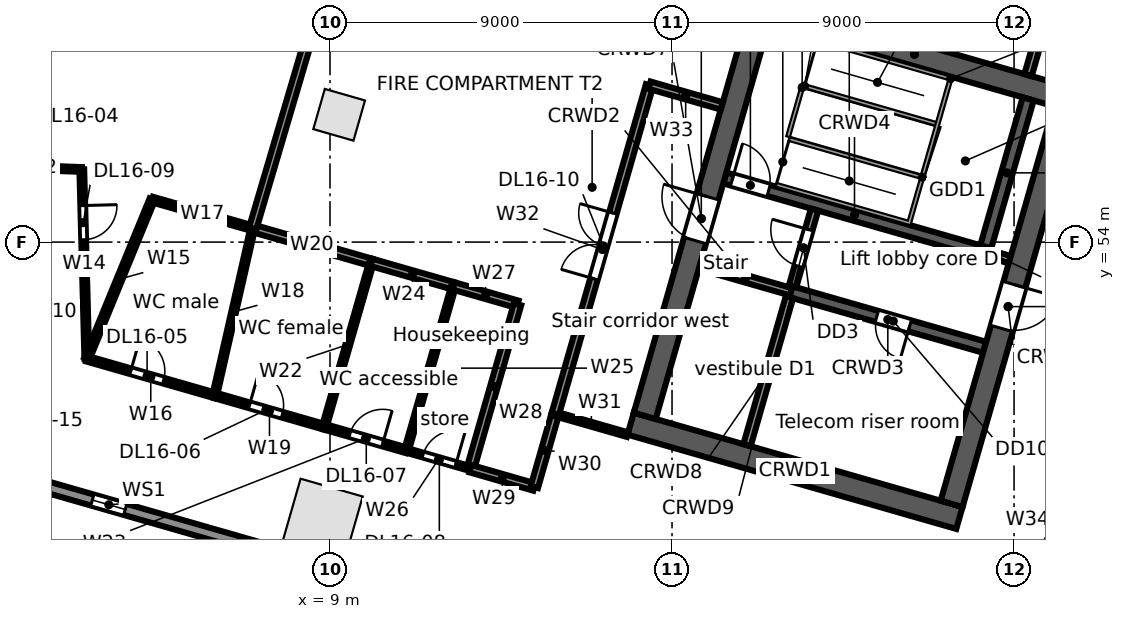
"""IFC4 building model, lengths in metres.
Left out: names, types, materials, properties, quantities, classifications, styles, units other than length and angle.
Written with IfcOpenShell. Run it as: python <this file> out.ifc"""

import sys

from ifc_helpers import new_model, si_unit, direction, frame, frame_2d, origin, origin_2d, place, context, subcontext, project, spatial, rectangle, extrude, element, fill, save


model = new_model("IFC4")
c1 = context("Model", 3, precision=1e-05, world=origin(), true_north=direction((0.0, 1.0)))
c2 = subcontext(c1, "Body", "Model", "MODEL_VIEW")
j1 = project(units=[si_unit("LENGTHUNIT", "METRE"), si_unit("PLANEANGLEUNIT", "RADIAN")], contexts=[c1])
p1 = place(None, origin())
s1 = spatial("IfcSite", under=j1, at=p1, CompositionType="ELEMENT")
p2 = place(p1, origin())
s2 = spatial("IfcBuilding", under=s1, at=p2, CompositionType="ELEMENT")
p3 = place(p2, frame((0.0, 0.0, 86.5)))
s3 = spatial("IfcBuildingStorey", under=s2, at=p3, CompositionType="ELEMENT", Elevation=86.5)
p4 = place(p3, frame((8.81, 46.722, 0.0), z_axis=(0.0, 0.0, 1.0), x_axis=(0.961261695938, -0.275637355817, 0.0)))
e1 = element("IfcColumn", 1, at=p4, inside=s3, PredefinedType="COLUMN", context=c2, shape_type="SweptSolid", body=[
    extrude(rectangle(XDim=1.7, YDim=1.7, at=origin_2d()), origin(), (0.0, 0.0, 1.0), 5.0),
])
p5 = place(p3, frame((9.241, 57.35, 0.0), z_axis=(0.0, 0.0, 1.0), x_axis=(0.961261695938, -0.275637355817, 0.0)))
e2 = element("IfcColumn", 2, at=p5, inside=s3, PredefinedType="COLUMN", context=c2, shape_type="SweptSolid", body=[
    extrude(rectangle(XDim=1.1, YDim=1.1, at=origin_2d()), origin(), (0.0, 0.0, 1.0), 5.0),
])
p6 = place(p3, frame((25.398, 40.717, 0.0), z_axis=(0.0, 0.0, 1.0), x_axis=(-0.961262423262, 0.275634819324, 0.0)))
e3 = element("IfcWall", 3, at=p6, inside=s3, PredefinedType="STANDARD", context=c2, shape_type="SweptSolid", body=[
    extrude(rectangle(XDim=26.359, YDim=0.3, at=frame_2d((13.179, 0.0))), origin(), (0.0, 0.0, 1.0), 4.65),
])
p7 = place(p6, frame((22.664, 0.0, 0.6)))
e4 = element("IfcOpeningElement", 4, at=p7, cuts=e3, PredefinedType="OPENING", context=c2, shape_type="SweptSolid", body=[
    extrude(rectangle(XDim=0.9, YDim=3.2, at=frame_2d((0.45, 1.6))), frame((0.0, 0.16, 0.0), z_axis=(0.0, -1.0, 0.0), x_axis=(1.0, 0.0, 0.0)), (0.0, 0.0, 1.0), 0.32),
])
p8 = place(p6, frame((13.844, 0.0, 0.6)))
e5 = element("IfcOpeningElement", 5, at=p8, cuts=e3, PredefinedType="OPENING", context=c2, shape_type="SweptSolid", body=[
    extrude(rectangle(XDim=0.9, YDim=3.2, at=frame_2d((0.45, 1.6))), frame((0.0, 0.16, 0.0), z_axis=(0.0, -1.0, 0.0), x_axis=(1.0, 0.0, 0.0)), (0.0, 0.0, 1.0), 0.32),
])
p9 = place(p6, frame((5.023, 0.0, 0.6)))
e6 = element("IfcOpeningElement", 6, at=p9, cuts=e3, PredefinedType="OPENING", context=c2, shape_type="SweptSolid", body=[
    extrude(rectangle(XDim=0.9, YDim=3.2, at=frame_2d((0.45, 1.6))), frame((0.0, 0.16, 0.0), z_axis=(0.0, -1.0, 0.0), x_axis=(1.0, 0.0, 0.0)), (0.0, 0.0, 1.0), 0.32),
])
p10 = place(p3, frame((16.911, 49.221, 0.0), z_axis=(0.0, 0.0, 1.0), x_axis=(0.96126248289, -0.275634611374, 0.0)))
e7 = element("IfcWall", 7, at=p10, inside=s3, PredefinedType="SOLIDWALL", context=c2, shape_type="SweptSolid", body=[
    extrude(rectangle(XDim=9.0, YDim=0.6, at=frame_2d((4.5, 0.0))), origin(), (0.0, 0.0, 1.0), 4.65),
])
p11 = place(p3, frame((18.728, 53.382, 0.0), z_axis=(0.0, 0.0, 1.0), x_axis=(0.961247070632, -0.275688355216, 0.0)))
e8 = element("IfcWall", 8, at=p11, inside=s3, PredefinedType="SOLIDWALL", context=c2, shape_type="SweptSolid", body=[
    extrude(rectangle(XDim=2.5, YDim=0.2, at=frame_2d((1.25, 0.0))), origin(), (0.0, 0.0, 1.0), 4.65),
])
p12 = place(p3, frame((21.131, 52.692, 0.0), z_axis=(0.0, 0.0, 1.0), x_axis=(0.961271492568, -0.275603188616, 0.0)))
e9 = element("IfcWall", 9, at=p12, inside=s3, PredefinedType="SOLIDWALL", context=c2, shape_type="SweptSolid", body=[
    extrude(rectangle(XDim=5.3, YDim=0.3, at=frame_2d((2.65, 0.0))), origin(), (0.0, 0.0, 1.0), 4.65),
])
p13 = place(p12, frame((2.35, 0.0, 0.0)))
e10 = element("IfcOpeningElement", 10, at=p13, cuts=e9, PredefinedType="OPENING", context=c2, shape_type="SweptSolid", body=[
    extrude(rectangle(XDim=0.9, YDim=2.1, at=frame_2d((0.45, 1.05))), frame((0.0, 0.16, 0.0), z_axis=(0.0, -1.0, 0.0), x_axis=(1.0, 0.0, 0.0)), (0.0, 0.0, 1.0), 0.32),
])
p14 = place(p3, frame((19.389, 55.689, 0.0), z_axis=(0.0, 0.0, 1.0), x_axis=(0.961261397636, -0.275638396117, 0.0)))
e11 = element("IfcWall", 11, at=p14, inside=s3, PredefinedType="SOLIDWALL", context=c2, shape_type="SweptSolid", body=[
    extrude(rectangle(XDim=7.1, YDim=0.3, at=frame_2d((3.55, 0.0))), origin(), (0.0, 0.0, 1.0), 4.65),
])
p15 = place(p14, frame((0.2, 0.0, 0.0)))
e12 = element("IfcOpeningElement", 12, at=p15, cuts=e11, PredefinedType="OPENING", context=c2, shape_type="SweptSolid", body=[
    extrude(rectangle(XDim=1.0, YDim=2.1, at=frame_2d((0.5, 1.05))), frame((0.0, 0.16, 0.0), z_axis=(0.0, -1.0, 0.0), x_axis=(1.0, 0.0, 0.0)), (0.0, 0.0, 1.0), 0.32),
])
p16 = place(p3, frame((26.214, 53.732, 0.0), z_axis=(0.0, 0.0, 1.0), x_axis=(0.96122076476, -0.27578005982, 0.0)))
e13 = element("IfcWall", 13, at=p16, inside=s3, PredefinedType="SOLIDWALL", context=c2, shape_type="SweptSolid", body=[
    extrude(rectangle(XDim=0.7, YDim=0.2, at=frame_2d((0.35, 0.0))), origin(), (0.0, 0.0, 1.0), 4.65),
])
p17 = place(p3, frame((20.053, 60.18, 0.0), z_axis=(0.0, 0.0, 1.0), x_axis=(0.96126248289, -0.275634611374, 0.0)))
e14 = element("IfcWall", 14, at=p17, inside=s3, PredefinedType="SOLIDWALL", context=c2, shape_type="SweptSolid", body=[
    extrude(rectangle(XDim=9.0, YDim=0.6, at=frame_2d((4.5, 0.0))), origin(), (0.0, 0.0, 1.0), 4.65),
])
p18 = place(p3, frame((17.282, 49.427, 0.0), z_axis=(0.0, 0.0, 1.0), x_axis=(0.275631631629, 0.961263337304, 0.0)))
e15 = element("IfcWall", 15, at=p18, inside=s3, PredefinedType="SOLIDWALL", context=c2, shape_type="SweptSolid", body=[
    extrude(rectangle(XDim=10.8, YDim=0.6, at=frame_2d((5.4, 0.0))), origin(), (0.0, 0.0, 1.0), 4.65),
])
p19 = place(p18, frame((4.8, 0.0, 0.0)))
e16 = element("IfcOpeningElement", 16, at=p19, cuts=e15, PredefinedType="OPENING", context=c2, shape_type="SweptSolid", body=[
    extrude(rectangle(XDim=1.2, YDim=2.1, at=frame_2d((0.6, 1.05))), frame((0.0, 0.31, 0.0), z_axis=(0.0, -1.0, 0.0), x_axis=(1.0, 0.0, 0.0)), (0.0, 0.0, 1.0), 0.62),
])
p20 = place(p3, frame((19.973, 48.655, 0.0), z_axis=(0.0, 0.0, 1.0), x_axis=(0.275668441653, 0.961252781674, 0.0)))
e17 = element("IfcWall", 17, at=p20, inside=s3, PredefinedType="SOLIDWALL", context=c2, shape_type="SweptSolid", body=[
    extrude(rectangle(XDim=4.05, YDim=0.2, at=frame_2d((2.025, 0.0))), origin(), (0.0, 0.0, 1.0), 4.65),
])
p21 = place(p3, frame((21.172, 52.837, 0.0), z_axis=(0.0, 0.0, 1.0), x_axis=(0.275657676022, 0.961255868981, 0.0)))
e18 = element("IfcWall", 18, at=p21, inside=s3, PredefinedType="PARTITIONING", context=c2, shape_type="SweptSolid", body=[
    extrude(rectangle(XDim=2.1, YDim=0.2, at=frame_2d((1.05, 0.0))), origin(), (0.0, 0.0, 1.0), 4.65),
])
p22 = place(p21, frame((0.55, 0.0, 0.0)))
e19 = element("IfcOpeningElement", 19, at=p22, cuts=e18, PredefinedType="OPENING", context=c2, shape_type="SweptSolid", body=[
    extrude(rectangle(XDim=1.0, YDim=2.1, at=frame_2d((0.5, 1.05))), frame((0.0, 0.11, 0.0), z_axis=(0.0, -1.0, 0.0), x_axis=(1.0, 0.0, 0.0)), (0.0, 0.0, 1.0), 0.22),
])
p23 = place(p3, frame((26.256, 53.876, 0.0), z_axis=(0.0, 0.0, 1.0), x_axis=(0.275612739511, 0.961268754209, 0.0)))
e20 = element("IfcWall", 20, at=p23, inside=s3, PredefinedType="SOLIDWALL", context=c2, shape_type="SweptSolid", body=[
    extrude(rectangle(XDim=4.05, YDim=0.3, at=frame_2d((2.025, 0.0))), origin(), (0.0, 0.0, 1.0), 4.65),
])
p24 = place(p3, frame((25.356, 47.112, 0.0), z_axis=(0.0, 0.0, 1.0), x_axis=(0.275631631629, 0.961263337304, 0.0)))
e21 = element("IfcWall", 21, at=p24, inside=s3, PredefinedType="SOLIDWALL", context=c2, shape_type="SweptSolid", body=[
    extrude(rectangle(XDim=10.8, YDim=0.6, at=frame_2d((5.4, 0.0))), origin(), (0.0, 0.0, 1.0), 4.65),
])
p25 = place(p24, frame((4.8, 0.0, 0.0)))
e22 = element("IfcOpeningElement", 22, at=p25, cuts=e21, PredefinedType="OPENING", context=c2, shape_type="SweptSolid", body=[
    extrude(rectangle(XDim=1.2, YDim=2.1, at=frame_2d((0.6, 1.05))), frame((0.0, 0.31, 0.0), z_axis=(0.0, -1.0, 0.0), x_axis=(1.0, 0.0, 0.0)), (0.0, 0.0, 1.0), 0.62),
])
p26 = place(p3, frame((0.0, 56.0, 0.0), z_axis=(0.0, 0.0, 1.0), x_axis=(0.999349313684, -0.036068673934, 0.0)))
e23 = element("IfcWall", 23, at=p26, inside=s3, PredefinedType="PARTITIONING", context=c2, shape_type="SweptSolid", body=[
    extrude(rectangle(XDim=2.471, YDim=0.125, at=frame_2d((1.235, 0.0))), origin(), (0.0, 0.0, 1.0), 4.65),
])
p27 = place(p3, frame((2.469, 55.911, 0.0), z_axis=(0.0, 0.0, 1.0), x_axis=(0.02651808123, -0.999648333849, 0.0)))
e24 = element("IfcWall", 24, at=p27, inside=s3, PredefinedType="PARTITIONING", context=c2, shape_type="SweptSolid", body=[
    extrude(rectangle(XDim=4.981, YDim=0.125, at=frame_2d((2.49, 0.0))), origin(), (0.0, 0.0, 1.0), 4.65),
])
p28 = place(p27, frame((0.95, 0.0, 0.0)))
e25 = element("IfcOpeningElement", 25, at=p28, cuts=e24, PredefinedType="OPENING", context=c2, shape_type="SweptSolid", body=[
    extrude(rectangle(XDim=0.9, YDim=2.1, at=frame_2d((0.45, 1.05))), frame((0.0, 0.073, 0.0), z_axis=(0.0, -1.0, 0.0), x_axis=(1.0, 0.0, 0.0)), (0.0, 0.0, 1.0), 0.145),
])
p29 = place(p3, frame((2.601, 50.932, 0.0), z_axis=(0.0, 0.0, 1.0), x_axis=(0.380066317543, 0.924959239247, 0.0)))
e26 = element("IfcWall", 26, at=p29, inside=s3, PredefinedType="PARTITIONING", context=c2, shape_type="SweptSolid", body=[
    extrude(rectangle(XDim=4.528, YDim=0.15, at=frame_2d((2.264, 0.0))), origin(), (0.0, 0.0, 1.0), 4.65),
])
p30 = place(p3, frame((2.601, 50.932, 0.0), z_axis=(0.0, 0.0, 1.0), x_axis=(0.961265606965, -0.27562371608, 0.0)))
e27 = element("IfcWall", 27, at=p30, inside=s3, PredefinedType="PARTITIONING", context=c2, shape_type="SweptSolid", body=[
    extrude(rectangle(XDim=3.5, YDim=0.15, at=frame_2d((1.75, 0.0))), origin(), (0.0, 0.0, 1.0), 4.65),
])
p31 = place(p30, frame((1.2, 0.0, 0.0)))
e28 = element("IfcOpeningElement", 28, at=p31, cuts=e27, PredefinedType="OPENING", context=c2, shape_type="SweptSolid", body=[
    extrude(rectangle(XDim=0.9, YDim=2.1, at=frame_2d((0.45, 1.05))), frame((0.0, 0.085, 0.0), z_axis=(0.0, -1.0, 0.0), x_axis=(1.0, 0.0, 0.0)), (0.0, 0.0, 1.0), 0.17),
])
p32 = place(p3, frame((4.322, 55.12, 0.0), z_axis=(0.0, 0.0, 1.0), x_axis=(0.961272337704, -0.275600240865, 0.0)))
e29 = element("IfcWall", 29, at=p32, inside=s3, PredefinedType="PARTITIONING", context=c2, shape_type="SweptSolid", body=[
    extrude(rectangle(XDim=2.75, YDim=0.15, at=frame_2d((1.375, 0.0))), origin(), (0.0, 0.0, 1.0), 4.65),
])
p33 = place(p3, frame((5.966, 49.967, 0.0), z_axis=(0.0, 0.0, 1.0), x_axis=(0.221859891223, 0.975078555126, 0.0)))
e30 = element("IfcWall", 30, at=p33, inside=s3, PredefinedType="PARTITIONING", context=c2, shape_type="SweptSolid", body=[
    extrude(rectangle(XDim=4.507, YDim=0.125, at=frame_2d((2.254, 0.0))), origin(), (0.0, 0.0, 1.0), 4.65),
])
p34 = place(p3, frame((5.966, 49.967, 0.0), z_axis=(0.0, 0.0, 1.0), x_axis=(0.961222353496, -0.275774522283, 0.0)))
e31 = element("IfcWall", 31, at=p34, inside=s3, PredefinedType="PARTITIONING", context=c2, shape_type="SweptSolid", body=[
    extrude(rectangle(XDim=2.999, YDim=0.15, at=frame_2d((1.5, 0.0))), origin(), (0.0, 0.0, 1.0), 3.83),
])
p35 = place(p34, frame((0.95, 0.0, 0.0)))
e32 = element("IfcOpeningElement", 32, at=p35, cuts=e31, PredefinedType="OPENING", context=c2, shape_type="SweptSolid", body=[
    extrude(rectangle(XDim=0.9, YDim=2.1, at=frame_2d((0.45, 1.05))), frame((0.0, 0.085, 0.0), z_axis=(0.0, -1.0, 0.0), x_axis=(1.0, 0.0, 0.0)), (0.0, 0.0, 1.0), 0.17),
])
p36 = place(p3, frame((6.966, 54.362, 0.0), z_axis=(0.0, 0.0, 1.0), x_axis=(0.961245650832, -0.275693305607, 0.0)))
e33 = element("IfcWall", 33, at=p36, inside=s3, PredefinedType="PARTITIONING", context=c2, shape_type="SweptSolid", body=[
    extrude(rectangle(XDim=3.25, YDim=0.2, at=frame_2d((1.625, 0.0))), origin(), (0.0, 0.0, 1.0), 3.83),
])
p37 = place(p3, frame((6.966, 54.362, 0.0), z_axis=(0.0, 0.0, 1.0), x_axis=(0.283027392509, 0.959111826165, 0.0)))
e34 = element("IfcWall", 34, at=p37, inside=s3, PredefinedType="PARTITIONING", context=c2, shape_type="SweptSolid", body=[
    extrude(rectangle(XDim=12.985, YDim=0.2, at=frame_2d((6.492, 0.0))), origin(), (0.0, 0.0, 1.0), 3.718),
])
p38 = place(p3, frame((8.849, 49.14, 0.0), z_axis=(0.0, 0.0, 1.0), x_axis=(0.275731175537, 0.961234788612, 0.0)))
e35 = element("IfcWall", 35, at=p38, inside=s3, PredefinedType="PARTITIONING", context=c2, shape_type="SweptSolid", body=[
    extrude(rectangle(XDim=4.501, YDim=0.125, at=frame_2d((2.25, 0.0))), origin(), (0.0, 0.0, 1.0), 3.83),
])
p39 = place(p3, frame((8.849, 49.14, 0.0), z_axis=(0.0, 0.0, 1.0), x_axis=(0.961298413165, -0.275509275429, 0.0)))
e36 = element("IfcWall", 36, at=p39, inside=s3, PredefinedType="PARTITIONING", context=c2, shape_type="SweptSolid", body=[
    extrude(rectangle(XDim=2.25, YDim=0.15, at=frame_2d((1.125, 0.0))), origin(), (0.0, 0.0, 1.0), 3.718),
])
p40 = place(p39, frame((0.7, 0.0, 0.0)))
e37 = element("IfcOpeningElement", 37, at=p40, cuts=e36, PredefinedType="OPENING", context=c2, shape_type="SweptSolid", body=[
    extrude(rectangle(XDim=0.9, YDim=2.1, at=frame_2d((0.45, 1.05))), frame((0.0, 0.085, 0.0), z_axis=(0.0, -1.0, 0.0), x_axis=(1.0, 0.0, 0.0)), (0.0, 0.0, 1.0), 0.17),
])
p41 = place(p3, frame((10.09, 53.466, 0.0), z_axis=(0.0, 0.0, 1.0), x_axis=(0.961269670038, -0.275609545309, 0.0)))
e38 = element("IfcWall", 38, at=p41, inside=s3, PredefinedType="PARTITIONING", context=c2, shape_type="SweptSolid", body=[
    extrude(rectangle(XDim=2.25, YDim=0.2, at=frame_2d((1.125, 0.0))), origin(), (0.0, 0.0, 1.0), 3.718),
])
p42 = place(p3, frame((11.012, 48.52, 0.0), z_axis=(0.0, 0.0, 1.0), x_axis=(0.275745553681, 0.96123066411, 0.0)))
e39 = element("IfcWall", 39, at=p42, inside=s3, PredefinedType="PARTITIONING", context=c2, shape_type="SweptSolid", body=[
    extrude(rectangle(XDim=4.5, YDim=0.125, at=frame_2d((2.25, 0.0))), origin(), (0.0, 0.0, 1.0), 4.65),
])
p43 = place(p3, frame((11.012, 48.52, 0.0), z_axis=(0.0, 0.0, 1.0), x_axis=(0.961323619822, -0.275421309946, 0.0)))
e40 = element("IfcWall", 40, at=p43, inside=s3, PredefinedType="PARTITIONING", context=c2, shape_type="SweptSolid", body=[
    extrude(rectangle(XDim=1.75, YDim=0.125, at=frame_2d((0.875, 0.0))), origin(), (0.0, 0.0, 1.0), 4.65),
])
p44 = place(p43, frame((0.45, 0.0, 0.0)))
e41 = element("IfcOpeningElement", 41, at=p44, cuts=e40, PredefinedType="OPENING", context=c2, shape_type="SweptSolid", body=[
    extrude(rectangle(XDim=0.9, YDim=2.1, at=frame_2d((0.45, 1.05))), frame((0.0, 0.073, 0.0), z_axis=(0.0, -1.0, 0.0), x_axis=(1.0, 0.0, 0.0)), (0.0, 0.0, 1.0), 0.145),
])
p45 = place(p3, frame((12.253, 52.846, 0.0), z_axis=(0.0, 0.0, 1.0), x_axis=(0.961175737212, -0.275936953296, 0.0)))
e42 = element("IfcWall", 42, at=p45, inside=s3, PredefinedType="PARTITIONING", context=c2, shape_type="SweptSolid", body=[
    extrude(rectangle(XDim=1.75, YDim=0.2, at=frame_2d((0.875, 0.0))), origin(), (0.0, 0.0, 1.0), 4.65),
])
p46 = place(p3, frame((12.694, 48.038, 0.0), z_axis=(0.0, 0.0, 1.0), x_axis=(0.275803080638, 0.96121415965, 0.0)))
e43 = element("IfcWall", 43, at=p46, inside=s3, PredefinedType="PARTITIONING", context=c2, shape_type="SweptSolid", body=[
    extrude(rectangle(XDim=4.5, YDim=0.2, at=frame_2d((2.25, 0.0))), origin(), (0.0, 0.0, 1.0), 4.65),
])
p47 = place(p3, frame((12.694, 48.038, 0.0), z_axis=(0.0, 0.0, 1.0), x_axis=(0.961170605556, -0.275954827854, 0.0)))
e44 = element("IfcWall", 44, at=p47, inside=s3, PredefinedType="PARTITIONING", context=c2, shape_type="SweptSolid", body=[
    extrude(rectangle(XDim=1.751, YDim=0.2, at=frame_2d((0.875, 0.0))), origin(), (0.0, 0.0, 1.0), 4.65),
])
p48 = place(p3, frame((14.377, 47.555, 0.0), z_axis=(0.0, 0.0, 1.0), x_axis=(0.275446387355, 0.961316434736, 0.0)))
e45 = element("IfcWall", 45, at=p48, inside=s3, PredefinedType="PARTITIONING", context=c2, shape_type="SweptSolid", body=[
    extrude(rectangle(XDim=2.0, YDim=0.2, at=frame_2d((1.0, 0.0))), origin(), (0.0, 0.0, 1.0), 4.65),
])
p49 = place(p3, frame((14.928, 49.478, 0.0), z_axis=(0.0, 0.0, 1.0), x_axis=(0.961243778232, -0.27569983462, 0.0)))
e46 = element("IfcWall", 46, at=p49, inside=s3, PredefinedType="PARTITIONING", context=c2, shape_type="SweptSolid", body=[
    extrude(rectangle(XDim=1.977, YDim=0.125, at=frame_2d((0.988, 0.0))), origin(), (0.0, 0.0, 1.0), 4.65),
])
p50 = place(p3, frame((14.928, 49.478, 0.0), z_axis=(0.0, 0.0, 1.0), x_axis=(0.275674053528, 0.961251172281, 0.0)))
e47 = element("IfcWall", 47, at=p50, inside=s3, PredefinedType="PARTITIONING", context=c2, shape_type="SweptSolid", body=[
    extrude(rectangle(XDim=9.0, YDim=0.2, at=frame_2d((4.5, 0.0))), origin(), (0.0, 0.0, 1.0), 3.718),
])
p51 = place(p50, frame((3.7, 0.0, 0.0)))
e48 = element("IfcOpeningElement", 48, at=p51, cuts=e47, PredefinedType="OPENING", context=c2, shape_type="SweptSolid", body=[
    extrude(rectangle(XDim=1.8, YDim=2.1, at=frame_2d((0.9, 1.05))), frame((0.0, 0.11, 0.0), z_axis=(0.0, -1.0, 0.0), x_axis=(1.0, 0.0, 0.0)), (0.0, 0.0, 1.0), 0.22),
])
p52 = place(p3, frame((17.409, 58.129, 0.0), z_axis=(0.0, 0.0, 1.0), x_axis=(0.961253165474, -0.275667103345, 0.0)))
e49 = element("IfcWall", 49, at=p52, inside=s3, PredefinedType="PARTITIONING", context=c2, shape_type="SweptSolid", body=[
    extrude(rectangle(XDim=1.977, YDim=0.2, at=frame_2d((0.988, 0.0))), origin(), (0.0, 0.0, 1.0), 4.65),
])
p53 = place(p3, frame((26.456, 42.338, 0.0), z_axis=(0.0, 0.0, 1.0), x_axis=(0.52980027265, 0.848122438743, 0.0)))
e50 = element("IfcWall", 50, at=p53, inside=s3, PredefinedType="PARTITIONING", context=c2, shape_type="SweptSolid", body=[
    extrude(rectangle(XDim=6.076, YDim=0.25, at=frame_2d((3.038, 0.0))), origin(), (0.0, 0.0, 1.0), 4.65),
])
p54 = place(p53, frame((2.2, 0.0, 0.0)))
e51 = element("IfcOpeningElement", 51, at=p54, cuts=e50, PredefinedType="OPENING", context=c2, shape_type="SweptSolid", body=[
    extrude(rectangle(XDim=1.8, YDim=2.1, at=frame_2d((0.9, 1.05))), frame((0.0, 0.135, 0.0), z_axis=(0.0, -1.0, 0.0), x_axis=(1.0, 0.0, 0.0)), (0.0, 0.0, 1.0), 0.27),
])
p55 = place(p3, frame((27.368, 58.394, 0.0), z_axis=(0.0, 0.0, 1.0), x_axis=(0.276295387056, 0.961072764722, 0.0)))
e52 = element("IfcWall", 52, at=p55, inside=s3, PredefinedType="PARTITIONING", context=c2, shape_type="SweptSolid", body=[
    extrude(rectangle(XDim=5.386, YDim=0.2, at=frame_2d((2.693, 0.0))), origin(), (0.0, 0.0, 1.0), 3.822),
])
p56 = place(p7, origin())
e53 = element("IfcWindow", 53, at=p56, inside=s3, PartitioningType="SINGLE_PANEL", PredefinedType="WINDOW", context=c2, shape_type="SweptSolid", body=[
    extrude(rectangle(XDim=0.9, YDim=3.2, at=frame_2d((0.45, 1.6))), frame((0.0, 0.03, 0.0), z_axis=(0.0, -1.0, 0.0), x_axis=(1.0, 0.0, 0.0)), (0.0, 0.0, 1.0), 0.06),
])
fill(e4, e53)
p57 = place(p15, origin())
e54 = element("IfcDoor", 54, at=p57, inside=s3, OperationType="SINGLE_SWING_LEFT", PredefinedType="DOOR", context=c2, shape_type="SweptSolid", body=[
    extrude(rectangle(XDim=1.0, YDim=2.1, at=frame_2d((0.5, 1.05))), frame((0.0, 0.025, 0.0), z_axis=(0.0, -1.0, 0.0), x_axis=(1.0, 0.0, 0.0)), (0.0, 0.0, 1.0), 0.05),
])
fill(e12, e54)
p58 = place(p22, origin())
e55 = element("IfcDoor", 55, at=p58, inside=s3, OperationType="SINGLE_SWING_RIGHT", PredefinedType="DOOR", context=c2, shape_type="SweptSolid", body=[
    extrude(rectangle(XDim=1.0, YDim=2.1, at=frame_2d((0.5, 1.05))), frame((0.0, 0.025, 0.0), z_axis=(0.0, -1.0, 0.0), x_axis=(1.0, 0.0, 0.0)), (0.0, 0.0, 1.0), 0.05),
])
fill(e19, e55)
p59 = place(p19, origin())
e56 = element("IfcDoor", 56, at=p59, inside=s3, OperationType="SINGLE_SWING_RIGHT", PredefinedType="DOOR", context=c2, shape_type="SweptSolid", body=[
    extrude(rectangle(XDim=1.2, YDim=2.1, at=frame_2d((0.6, 1.05))), frame((0.0, 0.025, 0.0), z_axis=(0.0, -1.0, 0.0), x_axis=(1.0, 0.0, 0.0)), (0.0, 0.0, 1.0), 0.05),
])
fill(e16, e56)
p60 = place(p25, frame((1.2, 0.0, 0.0), z_axis=(0.0, 0.0, 1.0), x_axis=(-1.0, 0.0, 0.0)))
e57 = element("IfcDoor", 57, at=p60, inside=s3, OperationType="SINGLE_SWING_LEFT", PredefinedType="DOOR", context=c2, shape_type="SweptSolid", body=[
    extrude(rectangle(XDim=1.2, YDim=2.1, at=frame_2d((0.6, 1.05))), frame((0.0, 0.025, 0.0), z_axis=(0.0, -1.0, 0.0), x_axis=(1.0, 0.0, 0.0)), (0.0, 0.0, 1.0), 0.05),
])
fill(e22, e57)
p61 = place(p13, frame((0.9, 0.0, 0.0), z_axis=(0.0, 0.0, 1.0), x_axis=(-1.0, 0.0, 0.0)))
e58 = element("IfcDoor", 58, at=p61, inside=s3, OperationType="SINGLE_SWING_LEFT", PredefinedType="DOOR", context=c2, shape_type="SweptSolid", body=[
    extrude(rectangle(XDim=0.9, YDim=2.1, at=frame_2d((0.45, 1.05))), frame((0.0, 0.025, 0.0), z_axis=(0.0, -1.0, 0.0), x_axis=(1.0, 0.0, 0.0)), (0.0, 0.0, 1.0), 0.05),
])
fill(e10, e58)
p62 = place(p31, origin())
e59 = element("IfcDoor", 59, at=p62, inside=s3, OperationType="SINGLE_SWING_LEFT", PredefinedType="DOOR", context=c2, shape_type="SweptSolid", body=[
    extrude(rectangle(XDim=0.9, YDim=2.1, at=frame_2d((0.45, 1.05))), frame((0.0, 0.025, 0.0), z_axis=(0.0, -1.0, 0.0), x_axis=(1.0, 0.0, 0.0)), (0.0, 0.0, 1.0), 0.05),
])
fill(e28, e59)
p63 = place(p35, origin())
e60 = element("IfcDoor", 60, at=p63, inside=s3, OperationType="SINGLE_SWING_LEFT", PredefinedType="DOOR", context=c2, shape_type="SweptSolid", body=[
    extrude(rectangle(XDim=0.9, YDim=2.1, at=frame_2d((0.45, 1.05))), frame((0.0, 0.025, 0.0), z_axis=(0.0, -1.0, 0.0), x_axis=(1.0, 0.0, 0.0)), (0.0, 0.0, 1.0), 0.05),
])
fill(e32, e60)
p64 = place(p40, origin())
e61 = element("IfcDoor", 61, at=p64, inside=s3, OperationType="SINGLE_SWING_RIGHT", PredefinedType="DOOR", context=c2, shape_type="SweptSolid", body=[
    extrude(rectangle(XDim=0.9, YDim=2.1, at=frame_2d((0.45, 1.05))), frame((0.0, 0.025, 0.0), z_axis=(0.0, -1.0, 0.0), x_axis=(1.0, 0.0, 0.0)), (0.0, 0.0, 1.0), 0.05),
])
fill(e37, e61)
p65 = place(p44, origin())
e62 = element("IfcDoor", 62, at=p65, inside=s3, OperationType="SINGLE_SWING_RIGHT", PredefinedType="DOOR", context=c2, shape_type="SweptSolid", body=[
    extrude(rectangle(XDim=0.9, YDim=2.1, at=frame_2d((0.45, 1.05))), frame((0.0, 0.025, 0.0), z_axis=(0.0, -1.0, 0.0), x_axis=(1.0, 0.0, 0.0)), (0.0, 0.0, 1.0), 0.05),
])
fill(e41, e62)
p66 = place(p28, origin())
e63 = element("IfcDoor", 63, at=p66, inside=s3, OperationType="SINGLE_SWING_LEFT", PredefinedType="DOOR", context=c2, shape_type="SweptSolid", body=[
    extrude(rectangle(XDim=0.9, YDim=2.1, at=frame_2d((0.45, 1.05))), frame((0.0, 0.025, 0.0), z_axis=(0.0, -1.0, 0.0), x_axis=(1.0, 0.0, 0.0)), (0.0, 0.0, 1.0), 0.05),
])
fill(e25, e63)
p67 = place(p51, origin())
e64 = element("IfcDoor", 64, at=p67, inside=s3, OperationType="DOUBLE_DOOR_SINGLE_SWING", PredefinedType="DOOR", context=c2, shape_type="SweptSolid", body=[
    extrude(rectangle(XDim=1.8, YDim=2.1, at=frame_2d((0.9, 1.05))), frame((0.0, 0.025, 0.0), z_axis=(0.0, -1.0, 0.0), x_axis=(1.0, 0.0, 0.0)), (0.0, 0.0, 1.0), 0.05),
])
fill(e48, e64)
save(model, sys.argv[1])
